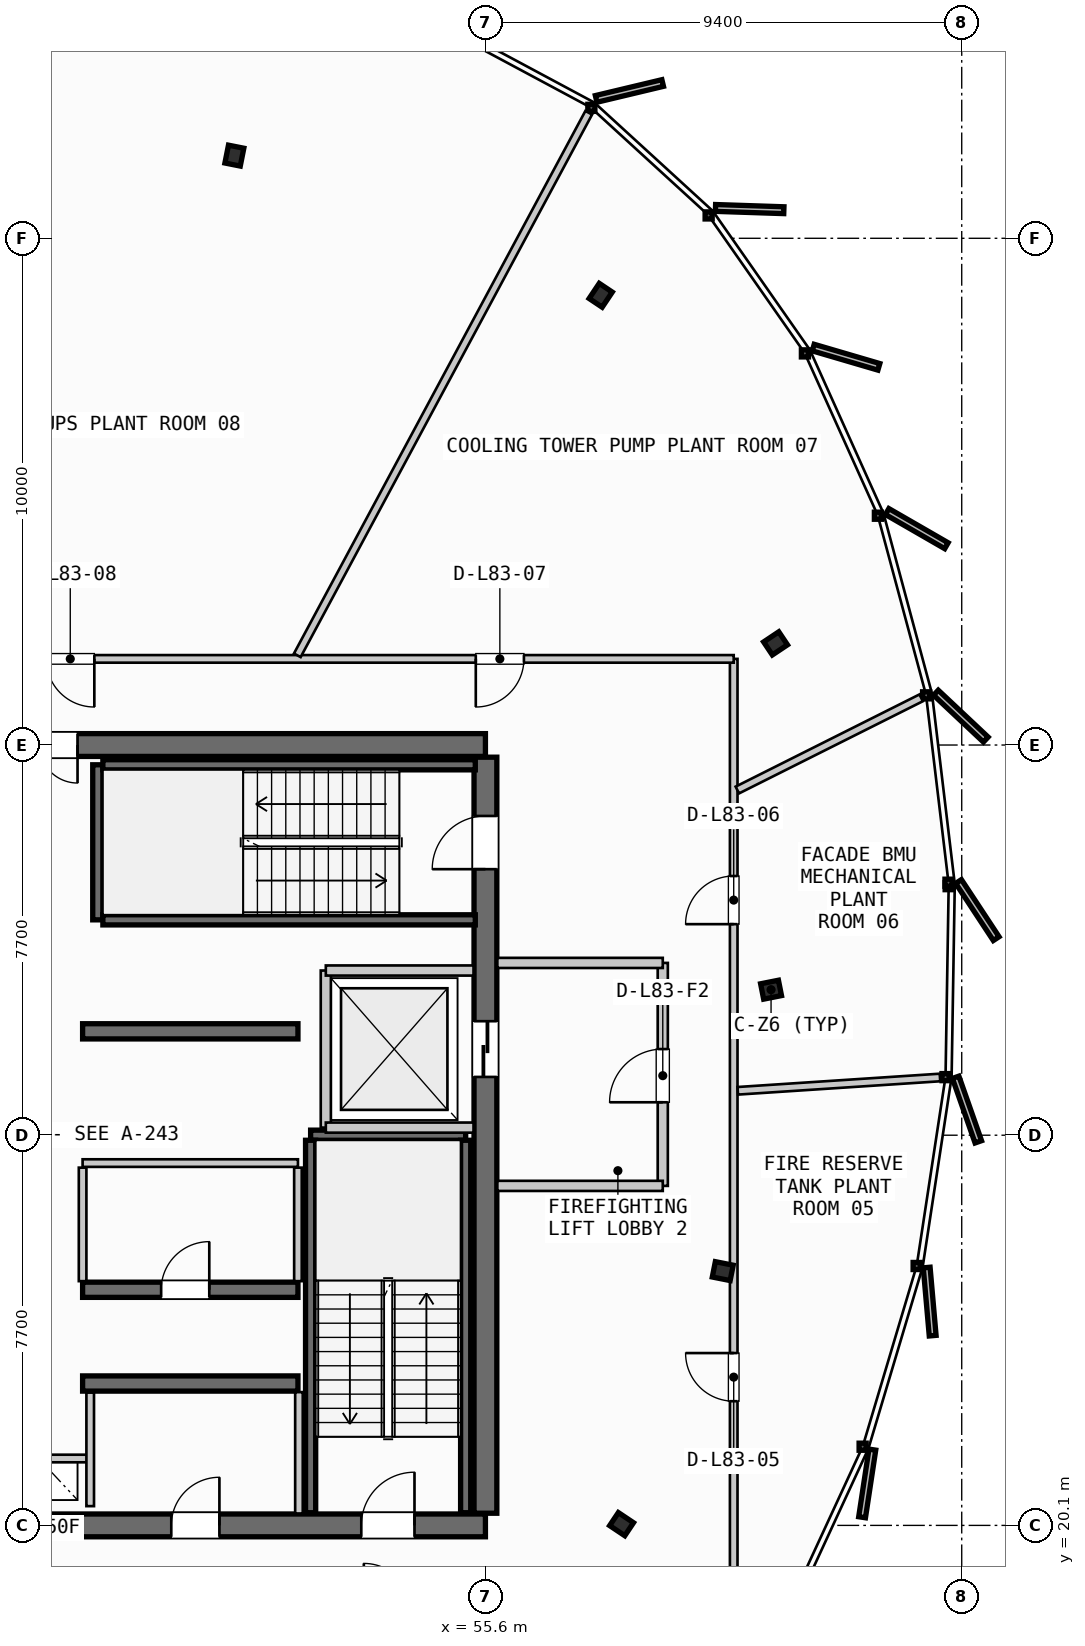
"""IFC4 building model, lengths in metres.
Left out: names, types, materials, properties, quantities, classifications, styles, units other than length and angle.
Written with IfcOpenShell. Run it as: python <this file> out.ifc"""

import sys

from ifc_helpers import new_model, si_unit, direction, frame, frame_2d, origin, origin_2d, place, context, subcontext, project, spatial, rectangle, i_section, extrude, source, transform, mapped, element, fill, save


model = new_model("IFC4")
c1 = context("Model", 3, precision=1e-05, world=origin(), true_north=direction((0.0, 1.0)))
c2 = subcontext(c1, "Body", "Model", "MODEL_VIEW")
j1 = project(units=[si_unit("LENGTHUNIT", "METRE"), si_unit("PLANEANGLEUNIT", "RADIAN")], contexts=[c1])
p1 = place(None, origin())
s1 = spatial("IfcSite", under=j1, at=p1, CompositionType="ELEMENT")
p2 = place(p1, origin())
s2 = spatial("IfcBuilding", under=s1, at=p2, CompositionType="ELEMENT")
p3 = place(p2, frame((0.0, 0.0, 312.3)))
s3 = spatial("IfcBuildingStorey", under=s2, at=p3, CompositionType="ELEMENT", Elevation=312.3)
p4 = place(p3, frame((38.0, 20.1, 0.0), z_axis=(0.0, 0.0, 1.0), x_axis=(1.0, 0.0, 0.0)))
e1 = element("IfcWall", 1, at=p4, inside=s3, PredefinedType="SHEAR", context=c2, shape_type="SweptSolid", body=[
    extrude(rectangle(XDim=17.6, YDim=0.45, at=frame_2d((8.8, 0.0))), origin(), (0.0, 0.0, 1.0), 3.735),
])
p5 = place(p4, frame((1.4, 0.0, 0.0)))
e2 = element("IfcOpeningElement", 2, at=p5, cuts=e1, PredefinedType="OPENING", context=c2, shape_type="SweptSolid", body=[
    extrude(rectangle(XDim=1.05, YDim=2.15, at=frame_2d((0.525, 1.075))), frame((0.0, 0.235, 0.0), z_axis=(0.0, -1.0, 0.0), x_axis=(1.0, 0.0, 0.0)), (0.0, 0.0, 1.0), 0.47),
])
p6 = place(p4, frame((15.15, 0.0, 0.0)))
e3 = element("IfcOpeningElement", 3, at=p6, cuts=e1, PredefinedType="OPENING", context=c2, shape_type="SweptSolid", body=[
    extrude(rectangle(XDim=1.05, YDim=2.15, at=frame_2d((0.525, 1.075))), frame((0.0, 0.235, 0.0), z_axis=(0.0, -1.0, 0.0), x_axis=(1.0, 0.0, 0.0)), (0.0, 0.0, 1.0), 0.47),
])
p7 = place(p4, frame((5.25, 0.0, 0.0)))
e4 = element("IfcOpeningElement", 4, at=p7, cuts=e1, PredefinedType="OPENING", context=c2, shape_type="SweptSolid", body=[
    extrude(rectangle(XDim=0.95, YDim=2.15, at=frame_2d((0.475, 1.075))), frame((0.0, 0.235, 0.0), z_axis=(0.0, -1.0, 0.0), x_axis=(1.0, 0.0, 0.0)), (0.0, 0.0, 1.0), 0.47),
])
p8 = place(p4, frame((11.4, 0.0, 0.0)))
e5 = element("IfcOpeningElement", 5, at=p8, cuts=e1, PredefinedType="OPENING", context=c2, shape_type="SweptSolid", body=[
    extrude(rectangle(XDim=0.95, YDim=2.15, at=frame_2d((0.475, 1.075))), frame((0.0, 0.235, 0.0), z_axis=(0.0, -1.0, 0.0), x_axis=(1.0, 0.0, 0.0)), (0.0, 0.0, 1.0), 0.47),
])
p9 = place(p3, frame((55.6, 35.5, 0.0), z_axis=(0.0, 0.0, 1.0), x_axis=(-1.0, 0.0, 0.0)))
e6 = element("IfcWall", 6, at=p9, inside=s3, PredefinedType="SHEAR", context=c2, shape_type="SweptSolid", body=[
    extrude(rectangle(XDim=17.6, YDim=0.45, at=frame_2d((8.8, 0.0))), origin(), (0.0, 0.0, 1.0), 3.735),
])
p10 = place(p9, frame((8.05, 0.0, 0.0)))
e7 = element("IfcOpeningElement", 7, at=p10, cuts=e6, PredefinedType="OPENING", context=c2, shape_type="SweptSolid", body=[
    extrude(rectangle(XDim=1.5, YDim=2.2, at=frame_2d((0.75, 1.1))), frame((0.0, 0.235, 0.0), z_axis=(0.0, -1.0, 0.0), x_axis=(1.0, 0.0, 0.0)), (0.0, 0.0, 1.0), 0.47),
])
p11 = place(p9, frame((15.1, 0.0, 0.0)))
e8 = element("IfcOpeningElement", 8, at=p11, cuts=e6, PredefinedType="OPENING", context=c2, shape_type="SweptSolid", body=[
    extrude(rectangle(XDim=0.95, YDim=2.15, at=frame_2d((0.475, 1.075))), frame((0.0, 0.235, 0.0), z_axis=(0.0, -1.0, 0.0), x_axis=(1.0, 0.0, 0.0)), (0.0, 0.0, 1.0), 0.47),
])
p12 = place(p9, frame((12.6, 0.0, 0.0)))
e9 = element("IfcOpeningElement", 9, at=p12, cuts=e6, PredefinedType="OPENING", context=c2, shape_type="SweptSolid", body=[
    extrude(rectangle(XDim=0.95, YDim=2.15, at=frame_2d((0.475, 1.075))), frame((0.0, 0.235, 0.0), z_axis=(0.0, -1.0, 0.0), x_axis=(1.0, 0.0, 0.0)), (0.0, 0.0, 1.0), 0.47),
])
p13 = place(p9, frame((10.45, 0.0, 0.0)))
e10 = element("IfcOpeningElement", 10, at=p13, cuts=e6, PredefinedType="OPENING", context=c2, shape_type="SweptSolid", body=[
    extrude(rectangle(XDim=0.95, YDim=2.15, at=frame_2d((0.475, 1.075))), frame((0.0, 0.235, 0.0), z_axis=(0.0, -1.0, 0.0), x_axis=(1.0, 0.0, 0.0)), (0.0, 0.0, 1.0), 0.47),
])
p14 = place(p3, frame((55.6, 20.34, 0.0), z_axis=(0.0, 0.0, 1.0), x_axis=(0.0, 1.0, 0.0)))
e11 = element("IfcWall", 11, at=p14, inside=s3, PredefinedType="SHEAR", context=c2, shape_type="SweptSolid", body=[
    extrude(rectangle(XDim=14.92, YDim=0.45, at=frame_2d((7.46, 0.0))), origin(), (0.0, 0.0, 1.0), 3.735),
])
p15 = place(p14, frame((12.71, 0.0, 0.0)))
e12 = element("IfcOpeningElement", 12, at=p15, cuts=e11, PredefinedType="OPENING", context=c2, shape_type="SweptSolid", body=[
    extrude(rectangle(XDim=1.05, YDim=2.15, at=frame_2d((0.525, 1.075))), frame((0.0, 0.235, 0.0), z_axis=(0.0, -1.0, 0.0), x_axis=(1.0, 0.0, 0.0)), (0.0, 0.0, 1.0), 0.47),
])
p16 = place(p14, frame((8.61, 0.0, 0.0)))
e13 = element("IfcOpeningElement", 13, at=p16, cuts=e11, PredefinedType="OPENING", context=c2, shape_type="SweptSolid", body=[
    extrude(rectangle(XDim=1.1, YDim=2.2, at=frame_2d((0.55, 1.1))), frame((0.0, 0.235, 0.0), z_axis=(0.0, -1.0, 0.0), x_axis=(1.0, 0.0, 0.0)), (0.0, 0.0, 1.0), 0.47),
])
p17 = place(p3, frame((47.65, 22.9, 0.0), z_axis=(0.0, 0.0, 1.0), x_axis=(1.0, 0.0, 0.0)))
e14 = element("IfcWall", 14, at=p17, inside=s3, PredefinedType="SHEAR", context=c2, shape_type="SweptSolid", body=[
    extrude(rectangle(XDim=4.25, YDim=0.3, at=frame_2d((2.125, 0.0))), origin(), (0.0, 0.0, 1.0), 3.735),
])
p18 = place(p3, frame((47.65, 24.75, 0.0), z_axis=(0.0, 0.0, 1.0), x_axis=(1.0, 0.0, 0.0)))
e15 = element("IfcWall", 15, at=p18, inside=s3, PredefinedType="SHEAR", context=c2, shape_type="SweptSolid", body=[
    extrude(rectangle(XDim=4.25, YDim=0.3, at=frame_2d((2.125, 0.0))), origin(), (0.0, 0.0, 1.0), 3.735),
])
p19 = place(p18, frame((1.55, 0.0, 0.0)))
e16 = element("IfcOpeningElement", 16, at=p19, cuts=e15, PredefinedType="OPENING", context=c2, shape_type="SweptSolid", body=[
    extrude(rectangle(XDim=0.95, YDim=2.15, at=frame_2d((0.475, 1.075))), frame((0.0, 0.16, 0.0), z_axis=(0.0, -1.0, 0.0), x_axis=(1.0, 0.0, 0.0)), (0.0, 0.0, 1.0), 0.32),
])
p20 = place(p3, frame((47.65, 29.85, 0.0), z_axis=(0.0, 0.0, 1.0), x_axis=(1.0, 0.0, 0.0)))
e17 = element("IfcWall", 17, at=p20, inside=s3, PredefinedType="SHEAR", context=c2, shape_type="SweptSolid", body=[
    extrude(rectangle(XDim=4.25, YDim=0.3, at=frame_2d((2.125, 0.0))), origin(), (0.0, 0.0, 1.0), 3.735),
])
m1 = source(origin(), c2, "Body", "SweptSolid", [
    extrude(i_section(OverallWidth=0.309, OverallDepth=0.359, WebThickness=0.016, FlangeThickness=0.026, FilletRadius=0.027, at=origin_2d()), origin(), (0.0, 0.0, 1.0), 3.735),
])
for number, where, z_axis, x_axis in (
    (18, (61.237, 30.672, 0.0), (0.0, 0.0, 1.0), (0.981, 0.195, 0.0)),
    (19, (61.326, 37.506, 0.0), (0.0, 0.0, 1.0), (0.831, 0.556, 0.0)),
    (20, (57.875, 44.375, 0.0), (0.0, 0.0, 1.0), (0.556, 0.831, 0.0)),
    (21, (50.645, 47.132, 0.0), (0.0, 0.0, 1.0), (0.195, 0.981, 0.0)),
    (22, (58.287, 20.125, 0.0), (0.0, 0.0, 1.0), (0.831, -0.556, 0.0)),
    (23, (60.284, 25.118, 0.0), (0.0, 0.0, 1.0), (0.981, -0.195, 0.0)),
):
    element("IfcColumn", number, at=place(p3, frame(where, z_axis=z_axis, x_axis=x_axis)), inside=s3, PredefinedType="COLUMN", context=c2, shape_type="MappedRepresentation", body=[
        mapped(m1, transform((0.0, 0.0, 0.0), scale=1.0)),
    ])
p21 = place(p3, frame((52.15, 27.8, 0.0), z_axis=(0.0, 0.0, 1.0), x_axis=(1.0, 0.0, 0.0)))
e24 = element("IfcWall", 24, at=p21, inside=s3, PredefinedType="SHEAR", context=c2, shape_type="SweptSolid", body=[
    extrude(rectangle(XDim=3.06, YDim=0.2, at=frame_2d((1.53, 0.0))), origin(), (0.0, 0.0, 1.0), 3.735),
])
for number, where, z_axis, x_axis in (
    (25, (55.21, 27.7, 0.0), (0.0, 0.0, 1.0), (0.0, -1.0, 0.0)),
    (26, (52.15, 20.35, 0.0), (0.0, 0.0, 1.0), (0.0, 1.0, 0.0)),
):
    element("IfcWall", number, at=place(p3, frame(where, z_axis=z_axis, x_axis=x_axis)), inside=s3, PredefinedType="SHEAR", context=c2, shape_type="SweptSolid", body=[
        extrude(rectangle(XDim=7.35, YDim=0.2, at=frame_2d((3.675, 0.0))), origin(), (0.0, 0.0, 1.0), 3.735),
    ])
p22 = place(p3, frame((47.95, 32.05, 0.0), z_axis=(0.0, 0.0, 1.0), x_axis=(0.0, 1.0, 0.0)))
e27 = element("IfcWall", 27, at=p22, inside=s3, PredefinedType="SHEAR", context=c2, shape_type="SweptSolid", body=[
    extrude(rectangle(XDim=3.06, YDim=0.2, at=frame_2d((1.53, 0.0))), origin(), (0.0, 0.0, 1.0), 3.735),
])
for number, where, z_axis, x_axis in (
    (28, (48.05, 35.11, 0.0), (0.0, 0.0, 1.0), (1.0, 0.0, 0.0)),
    (29, (55.4, 32.05, 0.0), (0.0, 0.0, 1.0), (-1.0, 0.0, 0.0)),
):
    element("IfcWall", number, at=place(p3, frame(where, z_axis=z_axis, x_axis=x_axis)), inside=s3, PredefinedType="SHEAR", context=c2, shape_type="SweptSolid", body=[
        extrude(rectangle(XDim=7.35, YDim=0.2, at=frame_2d((3.675, 0.0))), origin(), (0.0, 0.0, 1.0), 3.735),
    ])
p23 = place(p3, frame((45.8, 21.42, 0.0), z_axis=(0.0, 0.0, 1.0), x_axis=(1.0, 0.0, 0.0)))
e30 = element("IfcWall", 30, at=p23, inside=s3, PredefinedType="PARTITIONING", context=c2, shape_type="SweptSolid", body=[
    extrude(rectangle(XDim=2.0, YDim=0.15, at=frame_2d((1.0, 0.0))), origin(), (0.0, 0.0, 1.0), 3.26),
])
p24 = place(p3, frame((47.8, 20.48, 0.0), z_axis=(0.0, 0.0, 1.0), x_axis=(0.0, 1.0, 0.0)))
e31 = element("IfcWall", 31, at=p24, inside=s3, PredefinedType="PARTITIONING", context=c2, shape_type="SweptSolid", body=[
    extrude(rectangle(XDim=2.24, YDim=0.15, at=frame_2d((1.12, 0.0))), origin(), (0.0, 0.0, 1.0), 3.26),
])
p25 = place(p3, frame((52.45, 27.95, 0.0), z_axis=(0.0, 0.0, 1.0), x_axis=(0.0, 1.0, 0.0)))
e32 = element("IfcWall", 32, at=p25, inside=s3, PredefinedType="PARTITIONING", context=c2, shape_type="SweptSolid", body=[
    extrude(rectangle(XDim=3.1, YDim=0.2, at=frame_2d((1.55, 0.0))), origin(), (0.0, 0.0, 1.0), 3.26),
])
for number, where, z_axis, x_axis in (
    (33, (52.45, 27.95, 0.0), (0.0, 0.0, 1.0), (1.0, 0.0, 0.0)),
    (34, (52.45, 31.05, 0.0), (0.0, 0.0, 1.0), (1.0, 0.0, 0.0)),
):
    element("IfcWall", number, at=place(p3, frame(where, z_axis=z_axis, x_axis=x_axis)), inside=s3, PredefinedType="PARTITIONING", context=c2, shape_type="SweptSolid", body=[
        extrude(rectangle(XDim=2.915, YDim=0.2, at=frame_2d((1.458, 0.0))), origin(), (0.0, 0.0, 1.0), 3.26),
    ])
p26 = place(p3, frame((59.1, 26.8, 0.0), z_axis=(0.0, 0.0, 1.0), x_axis=(0.0, 1.0, 0.0)))
e35 = element("IfcWall", 35, at=p26, inside=s3, PredefinedType="PARTITIONING", context=c2, shape_type="SweptSolid", body=[
    extrude(rectangle(XDim=4.4, YDim=0.2, at=frame_2d((2.2, 0.0))), origin(), (0.0, 0.0, 1.0), 3.26),
])
p27 = place(p26, frame((1.65, 0.0, 0.0)))
e36 = element("IfcOpeningElement", 36, at=p27, cuts=e35, PredefinedType="OPENING", context=c2, shape_type="SweptSolid", body=[
    extrude(rectangle(XDim=1.05, YDim=2.15, at=frame_2d((0.525, 1.075))), frame((0.0, 0.11, 0.0), z_axis=(0.0, -1.0, 0.0), x_axis=(1.0, 0.0, 0.0)), (0.0, 0.0, 1.0), 0.22),
])
for number, where, z_axis, x_axis in (
    (37, (55.835, 26.8, 0.0), (0.0, 0.0, 1.0), (1.0, 0.0, 0.0)),
    (38, (55.835, 31.2, 0.0), (0.0, 0.0, 1.0), (1.0, 0.0, 0.0)),
):
    element("IfcWall", number, at=place(p3, frame(where, z_axis=z_axis, x_axis=x_axis)), inside=s3, PredefinedType="PARTITIONING", context=c2, shape_type="SweptSolid", body=[
        extrude(rectangle(XDim=3.265, YDim=0.2, at=frame_2d((1.633, 0.0))), origin(), (0.0, 0.0, 1.0), 3.26),
    ])
p28 = place(p3, frame((51.92, 20.335, 0.0), z_axis=(0.0, 0.0, 1.0), x_axis=(0.0, 1.0, 0.0)))
e39 = element("IfcWall", 39, at=p28, inside=s3, PredefinedType="PARTITIONING", context=c2, shape_type="SweptSolid", body=[
    extrude(rectangle(XDim=2.395, YDim=0.15, at=frame_2d((1.198, 0.0))), origin(), (0.0, 0.0, 1.0), 3.26),
])
p29 = place(p3, frame((47.65, 27.25, 0.0), z_axis=(0.0, 0.0, 1.0), x_axis=(1.0, 0.0, 0.0)))
e40 = element("IfcWall", 40, at=p29, inside=s3, PredefinedType="PARTITIONING", context=c2, shape_type="SweptSolid", body=[
    extrude(rectangle(XDim=4.25, YDim=0.15, at=frame_2d((2.125, 0.0))), origin(), (0.0, 0.0, 1.0), 3.26),
])
for number, where, z_axis, x_axis in (
    (41, (47.65, 24.92, 0.0), (0.0, 0.0, 1.0), (0.0, 1.0, 0.0)),
    (42, (51.9, 24.92, 0.0), (0.0, 0.0, 1.0), (0.0, 1.0, 0.0)),
):
    element("IfcWall", number, at=place(p3, frame(where, z_axis=z_axis, x_axis=x_axis)), inside=s3, PredefinedType="PARTITIONING", context=c2, shape_type="SweptSolid", body=[
        extrude(rectangle(XDim=2.24, YDim=0.15, at=frame_2d((1.12, 0.0))), origin(), (0.0, 0.0, 1.0), 3.26),
    ])
p30 = place(p3, frame((60.5, 18.4, 0.0), z_axis=(0.0, 0.0, 1.0), x_axis=(0.0, 1.0, 0.0)))
e43 = element("IfcWall", 43, at=p30, inside=s3, PredefinedType="PARTITIONING", context=c2, shape_type="SweptSolid", body=[
    extrude(rectangle(XDim=18.8, YDim=0.15, at=frame_2d((9.4, 0.0))), origin(), (0.0, 0.0, 1.0), 3.26),
])
p31 = place(p30, frame((4.151, 0.0, 0.0)))
e44 = element("IfcOpeningElement", 44, at=p31, cuts=e43, PredefinedType="OPENING", context=c2, shape_type="SweptSolid", body=[
    extrude(rectangle(XDim=0.95, YDim=2.15, at=frame_2d((0.475, 1.075))), frame((0.0, 0.085, 0.0), z_axis=(0.0, -1.0, 0.0), x_axis=(1.0, 0.0, 0.0)), (0.0, 0.0, 1.0), 0.17),
])
p32 = place(p30, frame((13.565, 0.0, 0.0)))
e45 = element("IfcOpeningElement", 45, at=p32, cuts=e43, PredefinedType="OPENING", context=c2, shape_type="SweptSolid", body=[
    extrude(rectangle(XDim=0.95, YDim=2.15, at=frame_2d((0.475, 1.075))), frame((0.0, 0.085, 0.0), z_axis=(0.0, -1.0, 0.0), x_axis=(1.0, 0.0, 0.0)), (0.0, 0.0, 1.0), 0.17),
])
p33 = place(p3, frame((60.5, 37.2, 0.0), z_axis=(0.0, 0.0, 1.0), x_axis=(-1.0, 0.0, 0.0)))
e46 = element("IfcWall", 46, at=p33, inside=s3, PredefinedType="PARTITIONING", context=c2, shape_type="SweptSolid", body=[
    extrude(rectangle(XDim=27.4, YDim=0.15, at=frame_2d((13.7, 0.0))), origin(), (0.0, 0.0, 1.0), 3.26),
])
p34 = place(p33, frame((4.14, 0.0, 0.0)))
e47 = element("IfcOpeningElement", 47, at=p34, cuts=e46, PredefinedType="OPENING", context=c2, shape_type="SweptSolid", body=[
    extrude(rectangle(XDim=0.95, YDim=2.15, at=frame_2d((0.475, 1.075))), frame((0.0, 0.085, 0.0), z_axis=(0.0, -1.0, 0.0), x_axis=(1.0, 0.0, 0.0)), (0.0, 0.0, 1.0), 0.17),
])
p35 = place(p33, frame((12.619, 0.0, 0.0)))
e48 = element("IfcOpeningElement", 48, at=p35, cuts=e46, PredefinedType="OPENING", context=c2, shape_type="SweptSolid", body=[
    extrude(rectangle(XDim=0.95, YDim=2.15, at=frame_2d((0.475, 1.075))), frame((0.0, 0.085, 0.0), z_axis=(0.0, -1.0, 0.0), x_axis=(1.0, 0.0, 0.0)), (0.0, 0.0, 1.0), 0.17),
])
p36 = place(p33, frame((19.903, 0.0, 0.0)))
e49 = element("IfcOpeningElement", 49, at=p36, cuts=e46, PredefinedType="OPENING", context=c2, shape_type="SweptSolid", body=[
    extrude(rectangle(XDim=0.95, YDim=2.15, at=frame_2d((0.475, 1.075))), frame((0.0, 0.085, 0.0), z_axis=(0.0, -1.0, 0.0), x_axis=(1.0, 0.0, 0.0)), (0.0, 0.0, 1.0), 0.17),
])
p37 = place(p3, frame((60.58, 28.676, 0.0), z_axis=(0.0, 0.0, 1.0), x_axis=(0.99783671246, 0.0657411231, 0.0)))
e50 = element("IfcWall", 50, at=p37, inside=s3, PredefinedType="PARTITIONING", context=c2, shape_type="SweptSolid", body=[
    extrude(rectangle(XDim=4.0, YDim=0.15, at=frame_2d((2.0, 0.0))), origin(), (0.0, 0.0, 1.0), 3.26),
])
p38 = place(p3, frame((60.572, 34.612, 0.0), z_axis=(0.0, 0.0, 1.0), x_axis=(0.893885115106, 0.448296108606, 0.0)))
e51 = element("IfcWall", 51, at=p38, inside=s3, PredefinedType="PARTITIONING", context=c2, shape_type="SweptSolid", body=[
    extrude(rectangle(XDim=4.058, YDim=0.15, at=frame_2d((2.029, 0.0))), origin(), (0.0, 0.0, 1.0), 3.26),
])
p39 = place(p3, frame((51.887, 37.271, 0.0), z_axis=(0.0, 0.0, 1.0), x_axis=(0.473223934603, 0.880942170474, 0.0)))
e52 = element("IfcWall", 52, at=p39, inside=s3, PredefinedType="PARTITIONING", context=c2, shape_type="SweptSolid", body=[
    extrude(rectangle(XDim=12.154, YDim=0.15, at=frame_2d((6.077, 0.0))), origin(), (0.0, 0.0, 1.0), 3.26),
])
m2 = source(origin(), c2, "Body", "SweptSolid", [
    extrude(rectangle(XDim=1.05, YDim=2.15, at=frame_2d((0.525, 1.075))), frame((0.0, 0.025, 0.0), z_axis=(0.0, -1.0, 0.0), x_axis=(1.0, 0.0, 0.0)), (0.0, 0.0, 1.0), 0.05),
])
p40 = place(p6, origin())
e53 = element("IfcDoor", 53, at=p40, inside=s3, OperationType="SINGLE_SWING_RIGHT", PredefinedType="DOOR", context=c2, shape_type="MappedRepresentation", body=[
    mapped(m2, transform((0.0, 0.0, 0.0), scale=1.0)),
])
fill(e3, e53)
p41 = place(p15, origin())
e54 = element("IfcDoor", 54, at=p41, inside=s3, OperationType="SINGLE_SWING_LEFT", PredefinedType="DOOR", context=c2, shape_type="MappedRepresentation", body=[
    mapped(m2, transform((0.0, 0.0, 0.0), scale=1.0)),
])
fill(e12, e54)
m3 = source(origin(), c2, "Body", "SweptSolid", [
    extrude(rectangle(XDim=1.5, YDim=2.2, at=frame_2d((0.75, 1.1))), frame((0.0, 0.025, 0.0), z_axis=(0.0, -1.0, 0.0), x_axis=(1.0, 0.0, 0.0)), (0.0, 0.0, 1.0), 0.05),
])
p42 = place(p10, origin())
e55 = element("IfcDoor", 55, at=p42, inside=s3, OperationType="DOUBLE_DOOR_SINGLE_SWING", PredefinedType="DOOR", context=c2, shape_type="MappedRepresentation", body=[
    mapped(m3, transform((0.0, 0.0, 0.0), scale=1.0)),
])
fill(e7, e55)
m4 = source(origin(), c2, "Body", "SweptSolid", [
    extrude(rectangle(XDim=1.1, YDim=2.2, at=frame_2d((0.55, 1.1))), frame((0.0, 0.025, 0.0), z_axis=(0.0, -1.0, 0.0), x_axis=(1.0, 0.0, 0.0)), (0.0, 0.0, 1.0), 0.05),
])
p43 = place(p16, origin())
e56 = element("IfcDoor", 56, at=p43, inside=s3, OperationType="SLIDING_TO_RIGHT", PredefinedType="DOOR", context=c2, shape_type="MappedRepresentation", body=[
    mapped(m4, transform((0.0, 0.0, 0.0), scale=1.0)),
])
fill(e13, e56)
m5 = source(origin(), c2, "Body", "SweptSolid", [
    extrude(rectangle(XDim=0.95, YDim=2.15, at=frame_2d((0.475, 1.075))), frame((0.0, 0.025, 0.0), z_axis=(0.0, -1.0, 0.0), x_axis=(1.0, 0.0, 0.0)), (0.0, 0.0, 1.0), 0.05),
])
p44 = place(p8, origin())
e57 = element("IfcDoor", 57, at=p44, inside=s3, OperationType="SINGLE_SWING_RIGHT", PredefinedType="DOOR", context=c2, shape_type="MappedRepresentation", body=[
    mapped(m5, transform((0.0, 0.0, 0.0), scale=1.0)),
])
fill(e5, e57)
p45 = place(p19, origin())
e58 = element("IfcDoor", 58, at=p45, inside=s3, OperationType="SINGLE_SWING_RIGHT", PredefinedType="DOOR", context=c2, shape_type="MappedRepresentation", body=[
    mapped(m5, transform((0.0, 0.0, 0.0), scale=1.0)),
])
fill(e16, e58)
p46 = place(p27, origin())
e59 = element("IfcDoor", 59, at=p46, inside=s3, OperationType="SINGLE_SWING_LEFT", PredefinedType="DOOR", context=c2, shape_type="MappedRepresentation", body=[
    mapped(m2, transform((0.0, 0.0, 0.0), scale=1.0)),
])
fill(e36, e59)
p47 = place(p31, origin())
e60 = element("IfcDoor", 60, at=p47, inside=s3, OperationType="SINGLE_SWING_RIGHT", PredefinedType="DOOR", context=c2, shape_type="MappedRepresentation", body=[
    mapped(m5, transform((0.0, 0.0, 0.0), scale=1.0)),
])
fill(e44, e60)
p48 = place(p32, origin())
e61 = element("IfcDoor", 61, at=p48, inside=s3, OperationType="SINGLE_SWING_LEFT", PredefinedType="DOOR", context=c2, shape_type="MappedRepresentation", body=[
    mapped(m5, transform((0.0, 0.0, 0.0), scale=1.0)),
])
fill(e45, e61)
p49 = place(p34, origin())
e62 = element("IfcDoor", 62, at=p49, inside=s3, OperationType="SINGLE_SWING_RIGHT", PredefinedType="DOOR", context=c2, shape_type="MappedRepresentation", body=[
    mapped(m5, transform((0.0, 0.0, 0.0), scale=1.0)),
])
fill(e47, e62)
p50 = place(p35, origin())
e63 = element("IfcDoor", 63, at=p50, inside=s3, OperationType="SINGLE_SWING_LEFT", PredefinedType="DOOR", context=c2, shape_type="MappedRepresentation", body=[
    mapped(m5, transform((0.0, 0.0, 0.0), scale=1.0)),
])
fill(e48, e63)
save(model, sys.argv[1])
